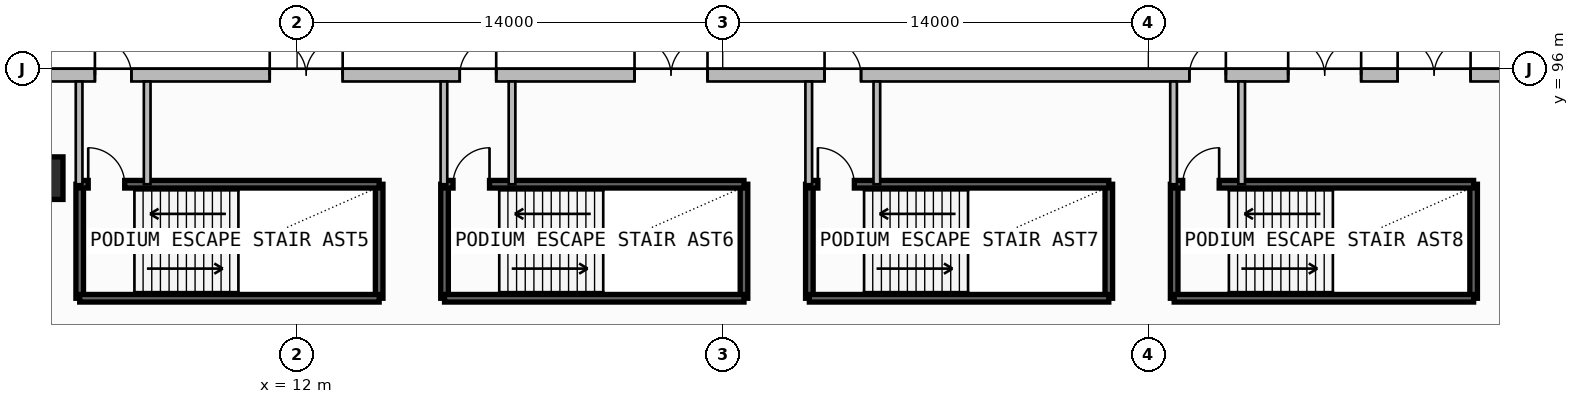
"""IFC4 building model, lengths in metres.
Left out: names, types, materials, properties, quantities, classifications, styles, units other than length and angle.
Written with IfcOpenShell. Run it as: python <this file> out.ifc"""

import sys

from ifc_helpers import new_model, si_unit, direction, frame, frame_2d, origin, origin_2d, place, context, subcontext, project, spatial, rectangle, extrude, element, fill, save


model = new_model("IFC4")
c1 = context("Model", 3, precision=1e-05, world=origin(), true_north=direction((0.0, 1.0)))
c2 = subcontext(c1, "Body", "Model", "MODEL_VIEW")
j1 = project(units=[si_unit("LENGTHUNIT", "METRE"), si_unit("PLANEANGLEUNIT", "RADIAN")], contexts=[c1])
p1 = place(None, origin())
s1 = spatial("IfcSite", under=j1, at=p1, CompositionType="ELEMENT")
p2 = place(p1, origin())
s2 = spatial("IfcBuilding", under=s1, at=p2, CompositionType="ELEMENT")
p3 = place(p2, origin())
s3 = spatial("IfcBuildingStorey", under=s2, at=p3, CompositionType="ELEMENT", Elevation=0.0)
p4 = place(p3, frame((3.6, 92.4, 0.0), z_axis=(0.0, 0.0, 1.0), x_axis=(1.0, 0.0, 0.0)))
e1 = element("IfcColumn", 1, at=p4, inside=s3, PredefinedType="COLUMN", context=c2, shape_type="SweptSolid", body=[
    extrude(rectangle(XDim=1.4, YDim=1.4, at=origin_2d()), origin(), (0.0, 0.0, 1.0), 4.5),
])
p5 = place(p3, frame((52.0, 95.79, 0.0), z_axis=(0.0, 0.0, 1.0), x_axis=(-1.0, 0.0, 0.0)))
e2 = element("IfcWall", 2, at=p5, inside=s3, PredefinedType="SOLIDWALL", context=c2, shape_type="SweptSolid", body=[
    extrude(rectangle(XDim=51.79, YDim=0.42, at=frame_2d((25.895, 0.0))), origin(), (0.0, 0.0, 1.0), 4.18),
])
p6 = place(p5, frame((1.4, 0.0, 0.0)))
e3 = element("IfcOpeningElement", 3, at=p6, cuts=e2, PredefinedType="OPENING", context=c2, shape_type="SweptSolid", body=[
    extrude(rectangle(XDim=2.4, YDim=2.4, at=frame_2d((1.2, 1.2))), frame((0.0, 0.22, 0.0), z_axis=(0.0, -1.0, 0.0), x_axis=(1.0, 0.0, 0.0)), (0.0, 0.0, 1.0), 0.44),
])
p7 = place(p5, frame((5.0, 0.0, 0.0)))
e4 = element("IfcOpeningElement", 4, at=p7, cuts=e2, PredefinedType="OPENING", context=c2, shape_type="SweptSolid", body=[
    extrude(rectangle(XDim=2.4, YDim=2.4, at=frame_2d((1.2, 1.2))), frame((0.0, 0.22, 0.0), z_axis=(0.0, -1.0, 0.0), x_axis=(1.0, 0.0, 0.0)), (0.0, 0.0, 1.0), 0.44),
])
p8 = place(p5, frame((26.5, 0.0, 0.0)))
e5 = element("IfcOpeningElement", 5, at=p8, cuts=e2, PredefinedType="OPENING", context=c2, shape_type="SweptSolid", body=[
    extrude(rectangle(XDim=2.4, YDim=2.4, at=frame_2d((1.2, 1.2))), frame((0.0, 0.22, 0.0), z_axis=(0.0, -1.0, 0.0), x_axis=(1.0, 0.0, 0.0)), (0.0, 0.0, 1.0), 0.44),
])
p9 = place(p5, frame((38.5, 0.0, 0.0)))
e6 = element("IfcOpeningElement", 6, at=p9, cuts=e2, PredefinedType="OPENING", context=c2, shape_type="SweptSolid", body=[
    extrude(rectangle(XDim=2.4, YDim=2.4, at=frame_2d((1.2, 1.2))), frame((0.0, 0.22, 0.0), z_axis=(0.0, -1.0, 0.0), x_axis=(1.0, 0.0, 0.0)), (0.0, 0.0, 1.0), 0.44),
])
p10 = place(p5, frame((45.45, 0.0, 0.0)))
e7 = element("IfcOpeningElement", 7, at=p10, cuts=e2, PredefinedType="OPENING", context=c2, shape_type="SweptSolid", body=[
    extrude(rectangle(XDim=1.2, YDim=2.2, at=frame_2d((0.6, 1.1))), frame((0.0, 0.22, 0.0), z_axis=(0.0, -1.0, 0.0), x_axis=(1.0, 0.0, 0.0)), (0.0, 0.0, 1.0), 0.44),
])
p11 = place(p5, frame((33.45, 0.0, 0.0)))
e8 = element("IfcOpeningElement", 8, at=p11, cuts=e2, PredefinedType="OPENING", context=c2, shape_type="SweptSolid", body=[
    extrude(rectangle(XDim=1.2, YDim=2.2, at=frame_2d((0.6, 1.1))), frame((0.0, 0.22, 0.0), z_axis=(0.0, -1.0, 0.0), x_axis=(1.0, 0.0, 0.0)), (0.0, 0.0, 1.0), 0.44),
])
p12 = place(p5, frame((21.45, 0.0, 0.0)))
e9 = element("IfcOpeningElement", 9, at=p12, cuts=e2, PredefinedType="OPENING", context=c2, shape_type="SweptSolid", body=[
    extrude(rectangle(XDim=1.2, YDim=2.2, at=frame_2d((0.6, 1.1))), frame((0.0, 0.22, 0.0), z_axis=(0.0, -1.0, 0.0), x_axis=(1.0, 0.0, 0.0)), (0.0, 0.0, 1.0), 0.44),
])
p13 = place(p5, frame((9.45, 0.0, 0.0)))
e10 = element("IfcOpeningElement", 10, at=p13, cuts=e2, PredefinedType="OPENING", context=c2, shape_type="SweptSolid", body=[
    extrude(rectangle(XDim=1.2, YDim=2.2, at=frame_2d((0.6, 1.1))), frame((0.0, 0.22, 0.0), z_axis=(0.0, -1.0, 0.0), x_axis=(1.0, 0.0, 0.0)), (0.0, 0.0, 1.0), 0.44),
])
for number, where, z_axis, x_axis in (
    (11, (4.85, 88.45, -0.4), (0.0, 0.0, 1.0), (0.0, 1.0, 0.0)),
    (12, (14.7, 88.45, -0.4), (0.0, 0.0, 1.0), (0.0, 1.0, 0.0)),
):
    element("IfcWall", number, at=place(p3, frame(where, z_axis=z_axis, x_axis=x_axis)), inside=s3, PredefinedType="SOLIDWALL", context=c2, shape_type="SweptSolid", body=[
        extrude(rectangle(XDim=3.75, YDim=0.25, at=frame_2d((1.875, 0.0))), origin(), (0.0, 0.0, 1.0), 4.58),
    ])
p14 = place(p3, frame((4.85, 92.2, -0.4), z_axis=(0.0, 0.0, 1.0), x_axis=(1.0, 0.0, 0.0)))
e13 = element("IfcWall", 13, at=p14, inside=s3, PredefinedType="SOLIDWALL", context=c2, shape_type="SweptSolid", body=[
    extrude(rectangle(XDim=9.85, YDim=0.25, at=frame_2d((4.925, 0.0))), origin(), (0.0, 0.0, 1.0), 4.58),
])
p15 = place(p14, frame((0.28, 0.0, 0.4)))
e14 = element("IfcOpeningElement", 14, at=p15, cuts=e13, PredefinedType="OPENING", context=c2, shape_type="SweptSolid", body=[
    extrude(rectangle(XDim=1.2, YDim=2.2, at=frame_2d((0.6, 1.1))), frame((0.0, 0.135, 0.0), z_axis=(0.0, -1.0, 0.0), x_axis=(1.0, 0.0, 0.0)), (0.0, 0.0, 1.0), 0.27),
])
p16 = place(p3, frame((4.85, 88.45, -0.4), z_axis=(0.0, 0.0, 1.0), x_axis=(1.0, 0.0, 0.0)))
e15 = element("IfcWall", 15, at=p16, inside=s3, PredefinedType="SOLIDWALL", context=c2, shape_type="SweptSolid", body=[
    extrude(rectangle(XDim=9.85, YDim=0.25, at=frame_2d((4.925, 0.0))), origin(), (0.0, 0.0, 1.0), 4.58),
])
for number, where, z_axis, x_axis in (
    (16, (4.83, 92.2, 0.0), (0.0, 0.0, 1.0), (0.0, 1.0, 0.0)),
    (17, (7.07, 92.2, 0.0), (0.0, 0.0, 1.0), (0.0, 1.0, 0.0)),
):
    element("IfcWall", number, at=place(p3, frame(where, z_axis=z_axis, x_axis=x_axis)), inside=s3, PredefinedType="SOLIDWALL", context=c2, shape_type="SweptSolid", body=[
        extrude(rectangle(XDim=3.38, YDim=0.22, at=frame_2d((1.69, 0.0))), origin(), (0.0, 0.0, 1.0), 4.18),
    ])
for number, where, z_axis, x_axis in (
    (18, (16.85, 88.45, -0.4), (0.0, 0.0, 1.0), (0.0, 1.0, 0.0)),
    (19, (26.7, 88.45, -0.4), (0.0, 0.0, 1.0), (0.0, 1.0, 0.0)),
):
    element("IfcWall", number, at=place(p3, frame(where, z_axis=z_axis, x_axis=x_axis)), inside=s3, PredefinedType="SOLIDWALL", context=c2, shape_type="SweptSolid", body=[
        extrude(rectangle(XDim=3.75, YDim=0.25, at=frame_2d((1.875, 0.0))), origin(), (0.0, 0.0, 1.0), 4.58),
    ])
p17 = place(p3, frame((16.85, 92.2, -0.4), z_axis=(0.0, 0.0, 1.0), x_axis=(1.0, 0.0, 0.0)))
e20 = element("IfcWall", 20, at=p17, inside=s3, PredefinedType="SOLIDWALL", context=c2, shape_type="SweptSolid", body=[
    extrude(rectangle(XDim=9.85, YDim=0.25, at=frame_2d((4.925, 0.0))), origin(), (0.0, 0.0, 1.0), 4.58),
])
p18 = place(p17, frame((0.28, 0.0, 0.4)))
e21 = element("IfcOpeningElement", 21, at=p18, cuts=e20, PredefinedType="OPENING", context=c2, shape_type="SweptSolid", body=[
    extrude(rectangle(XDim=1.2, YDim=2.2, at=frame_2d((0.6, 1.1))), frame((0.0, 0.135, 0.0), z_axis=(0.0, -1.0, 0.0), x_axis=(1.0, 0.0, 0.0)), (0.0, 0.0, 1.0), 0.27),
])
p19 = place(p3, frame((16.85, 88.45, -0.4), z_axis=(0.0, 0.0, 1.0), x_axis=(1.0, 0.0, 0.0)))
e22 = element("IfcWall", 22, at=p19, inside=s3, PredefinedType="SOLIDWALL", context=c2, shape_type="SweptSolid", body=[
    extrude(rectangle(XDim=9.85, YDim=0.25, at=frame_2d((4.925, 0.0))), origin(), (0.0, 0.0, 1.0), 4.58),
])
for number, where, z_axis, x_axis in (
    (23, (16.83, 92.2, 0.0), (0.0, 0.0, 1.0), (0.0, 1.0, 0.0)),
    (24, (19.07, 92.2, 0.0), (0.0, 0.0, 1.0), (0.0, 1.0, 0.0)),
):
    element("IfcWall", number, at=place(p3, frame(where, z_axis=z_axis, x_axis=x_axis)), inside=s3, PredefinedType="SOLIDWALL", context=c2, shape_type="SweptSolid", body=[
        extrude(rectangle(XDim=3.38, YDim=0.22, at=frame_2d((1.69, 0.0))), origin(), (0.0, 0.0, 1.0), 4.18),
    ])
for number, where, z_axis, x_axis in (
    (25, (28.85, 88.45, -0.4), (0.0, 0.0, 1.0), (0.0, 1.0, 0.0)),
    (26, (38.7, 88.45, -0.4), (0.0, 0.0, 1.0), (0.0, 1.0, 0.0)),
):
    element("IfcWall", number, at=place(p3, frame(where, z_axis=z_axis, x_axis=x_axis)), inside=s3, PredefinedType="SOLIDWALL", context=c2, shape_type="SweptSolid", body=[
        extrude(rectangle(XDim=3.75, YDim=0.25, at=frame_2d((1.875, 0.0))), origin(), (0.0, 0.0, 1.0), 4.58),
    ])
p20 = place(p3, frame((28.85, 92.2, -0.4), z_axis=(0.0, 0.0, 1.0), x_axis=(1.0, 0.0, 0.0)))
e27 = element("IfcWall", 27, at=p20, inside=s3, PredefinedType="SOLIDWALL", context=c2, shape_type="SweptSolid", body=[
    extrude(rectangle(XDim=9.85, YDim=0.25, at=frame_2d((4.925, 0.0))), origin(), (0.0, 0.0, 1.0), 4.58),
])
p21 = place(p20, frame((0.28, 0.0, 0.4)))
e28 = element("IfcOpeningElement", 28, at=p21, cuts=e27, PredefinedType="OPENING", context=c2, shape_type="SweptSolid", body=[
    extrude(rectangle(XDim=1.2, YDim=2.2, at=frame_2d((0.6, 1.1))), frame((0.0, 0.135, 0.0), z_axis=(0.0, -1.0, 0.0), x_axis=(1.0, 0.0, 0.0)), (0.0, 0.0, 1.0), 0.27),
])
p22 = place(p3, frame((28.85, 88.45, -0.4), z_axis=(0.0, 0.0, 1.0), x_axis=(1.0, 0.0, 0.0)))
e29 = element("IfcWall", 29, at=p22, inside=s3, PredefinedType="SOLIDWALL", context=c2, shape_type="SweptSolid", body=[
    extrude(rectangle(XDim=9.85, YDim=0.25, at=frame_2d((4.925, 0.0))), origin(), (0.0, 0.0, 1.0), 4.58),
])
for number, where, z_axis, x_axis in (
    (30, (28.83, 92.2, 0.0), (0.0, 0.0, 1.0), (0.0, 1.0, 0.0)),
    (31, (31.07, 92.2, 0.0), (0.0, 0.0, 1.0), (0.0, 1.0, 0.0)),
):
    element("IfcWall", number, at=place(p3, frame(where, z_axis=z_axis, x_axis=x_axis)), inside=s3, PredefinedType="SOLIDWALL", context=c2, shape_type="SweptSolid", body=[
        extrude(rectangle(XDim=3.38, YDim=0.22, at=frame_2d((1.69, 0.0))), origin(), (0.0, 0.0, 1.0), 4.18),
    ])
for number, where, z_axis, x_axis in (
    (32, (40.85, 88.45, -0.4), (0.0, 0.0, 1.0), (0.0, 1.0, 0.0)),
    (33, (50.7, 88.45, -0.4), (0.0, 0.0, 1.0), (0.0, 1.0, 0.0)),
):
    element("IfcWall", number, at=place(p3, frame(where, z_axis=z_axis, x_axis=x_axis)), inside=s3, PredefinedType="SOLIDWALL", context=c2, shape_type="SweptSolid", body=[
        extrude(rectangle(XDim=3.75, YDim=0.25, at=frame_2d((1.875, 0.0))), origin(), (0.0, 0.0, 1.0), 4.58),
    ])
p23 = place(p3, frame((40.85, 92.2, -0.4), z_axis=(0.0, 0.0, 1.0), x_axis=(1.0, 0.0, 0.0)))
e34 = element("IfcWall", 34, at=p23, inside=s3, PredefinedType="SOLIDWALL", context=c2, shape_type="SweptSolid", body=[
    extrude(rectangle(XDim=9.85, YDim=0.25, at=frame_2d((4.925, 0.0))), origin(), (0.0, 0.0, 1.0), 4.58),
])
p24 = place(p23, frame((0.28, 0.0, 0.4)))
e35 = element("IfcOpeningElement", 35, at=p24, cuts=e34, PredefinedType="OPENING", context=c2, shape_type="SweptSolid", body=[
    extrude(rectangle(XDim=1.2, YDim=2.2, at=frame_2d((0.6, 1.1))), frame((0.0, 0.135, 0.0), z_axis=(0.0, -1.0, 0.0), x_axis=(1.0, 0.0, 0.0)), (0.0, 0.0, 1.0), 0.27),
])
p25 = place(p3, frame((40.85, 88.45, -0.4), z_axis=(0.0, 0.0, 1.0), x_axis=(1.0, 0.0, 0.0)))
e36 = element("IfcWall", 36, at=p25, inside=s3, PredefinedType="SOLIDWALL", context=c2, shape_type="SweptSolid", body=[
    extrude(rectangle(XDim=9.85, YDim=0.25, at=frame_2d((4.925, 0.0))), origin(), (0.0, 0.0, 1.0), 4.58),
])
for number, where, z_axis, x_axis in (
    (37, (40.83, 92.2, 0.0), (0.0, 0.0, 1.0), (0.0, 1.0, 0.0)),
    (38, (43.07, 92.2, 0.0), (0.0, 0.0, 1.0), (0.0, 1.0, 0.0)),
):
    element("IfcWall", number, at=place(p3, frame(where, z_axis=z_axis, x_axis=x_axis)), inside=s3, PredefinedType="SOLIDWALL", context=c2, shape_type="SweptSolid", body=[
        extrude(rectangle(XDim=3.38, YDim=0.22, at=frame_2d((1.69, 0.0))), origin(), (0.0, 0.0, 1.0), 4.18),
    ])
p26 = place(p6, frame((2.4, 0.0, 0.0), z_axis=(0.0, 0.0, 1.0), x_axis=(-1.0, 0.0, 0.0)))
e39 = element("IfcDoor", 39, at=p26, inside=s3, OperationType="DOUBLE_DOOR_SINGLE_SWING", PredefinedType="USERDEFINED", context=c2, shape_type="SweptSolid", body=[
    extrude(rectangle(XDim=2.4, YDim=2.4, at=frame_2d((1.2, 1.2))), frame((0.0, 0.025, 0.0), z_axis=(0.0, -1.0, 0.0), x_axis=(1.0, 0.0, 0.0)), (0.0, 0.0, 1.0), 0.05),
])
fill(e3, e39)
p27 = place(p7, frame((2.4, 0.0, 0.0), z_axis=(0.0, 0.0, 1.0), x_axis=(-1.0, 0.0, 0.0)))
e40 = element("IfcDoor", 40, at=p27, inside=s3, OperationType="DOUBLE_DOOR_SINGLE_SWING", PredefinedType="USERDEFINED", context=c2, shape_type="SweptSolid", body=[
    extrude(rectangle(XDim=2.4, YDim=2.4, at=frame_2d((1.2, 1.2))), frame((0.0, 0.025, 0.0), z_axis=(0.0, -1.0, 0.0), x_axis=(1.0, 0.0, 0.0)), (0.0, 0.0, 1.0), 0.05),
])
fill(e4, e40)
p28 = place(p8, frame((2.4, 0.0, 0.0), z_axis=(0.0, 0.0, 1.0), x_axis=(-1.0, 0.0, 0.0)))
e41 = element("IfcDoor", 41, at=p28, inside=s3, OperationType="DOUBLE_DOOR_SINGLE_SWING", PredefinedType="USERDEFINED", context=c2, shape_type="SweptSolid", body=[
    extrude(rectangle(XDim=2.4, YDim=2.4, at=frame_2d((1.2, 1.2))), frame((0.0, 0.025, 0.0), z_axis=(0.0, -1.0, 0.0), x_axis=(1.0, 0.0, 0.0)), (0.0, 0.0, 1.0), 0.05),
])
fill(e5, e41)
p29 = place(p9, frame((2.4, 0.0, 0.0), z_axis=(0.0, 0.0, 1.0), x_axis=(-1.0, 0.0, 0.0)))
e42 = element("IfcDoor", 42, at=p29, inside=s3, OperationType="DOUBLE_DOOR_SINGLE_SWING", PredefinedType="USERDEFINED", context=c2, shape_type="SweptSolid", body=[
    extrude(rectangle(XDim=2.4, YDim=2.4, at=frame_2d((1.2, 1.2))), frame((0.0, 0.025, 0.0), z_axis=(0.0, -1.0, 0.0), x_axis=(1.0, 0.0, 0.0)), (0.0, 0.0, 1.0), 0.05),
])
fill(e6, e42)
p30 = place(p10, frame((1.2, 0.0, 0.0), z_axis=(0.0, 0.0, 1.0), x_axis=(-1.0, 0.0, 0.0)))
e43 = element("IfcDoor", 43, at=p30, inside=s3, OperationType="SINGLE_SWING_LEFT", PredefinedType="USERDEFINED", context=c2, shape_type="SweptSolid", body=[
    extrude(rectangle(XDim=1.2, YDim=2.2, at=frame_2d((0.6, 1.1))), frame((0.0, 0.025, 0.0), z_axis=(0.0, -1.0, 0.0), x_axis=(1.0, 0.0, 0.0)), (0.0, 0.0, 1.0), 0.05),
])
fill(e7, e43)
p31 = place(p11, frame((1.2, 0.0, 0.0), z_axis=(0.0, 0.0, 1.0), x_axis=(-1.0, 0.0, 0.0)))
e44 = element("IfcDoor", 44, at=p31, inside=s3, OperationType="SINGLE_SWING_RIGHT", PredefinedType="USERDEFINED", context=c2, shape_type="SweptSolid", body=[
    extrude(rectangle(XDim=1.2, YDim=2.2, at=frame_2d((0.6, 1.1))), frame((0.0, 0.025, 0.0), z_axis=(0.0, -1.0, 0.0), x_axis=(1.0, 0.0, 0.0)), (0.0, 0.0, 1.0), 0.05),
])
fill(e8, e44)
p32 = place(p12, frame((1.2, 0.0, 0.0), z_axis=(0.0, 0.0, 1.0), x_axis=(-1.0, 0.0, 0.0)))
e45 = element("IfcDoor", 45, at=p32, inside=s3, OperationType="SINGLE_SWING_LEFT", PredefinedType="USERDEFINED", context=c2, shape_type="SweptSolid", body=[
    extrude(rectangle(XDim=1.2, YDim=2.2, at=frame_2d((0.6, 1.1))), frame((0.0, 0.025, 0.0), z_axis=(0.0, -1.0, 0.0), x_axis=(1.0, 0.0, 0.0)), (0.0, 0.0, 1.0), 0.05),
])
fill(e9, e45)
p33 = place(p13, frame((1.2, 0.0, 0.0), z_axis=(0.0, 0.0, 1.0), x_axis=(-1.0, 0.0, 0.0)))
e46 = element("IfcDoor", 46, at=p33, inside=s3, OperationType="SINGLE_SWING_RIGHT", PredefinedType="USERDEFINED", context=c2, shape_type="SweptSolid", body=[
    extrude(rectangle(XDim=1.2, YDim=2.2, at=frame_2d((0.6, 1.1))), frame((0.0, 0.025, 0.0), z_axis=(0.0, -1.0, 0.0), x_axis=(1.0, 0.0, 0.0)), (0.0, 0.0, 1.0), 0.05),
])
fill(e10, e46)
p34 = place(p15, origin())
e47 = element("IfcDoor", 47, at=p34, inside=s3, OperationType="SINGLE_SWING_LEFT", PredefinedType="USERDEFINED", context=c2, shape_type="SweptSolid", body=[
    extrude(rectangle(XDim=1.2, YDim=2.2, at=frame_2d((0.6, 1.1))), frame((0.0, 0.025, 0.0), z_axis=(0.0, -1.0, 0.0), x_axis=(1.0, 0.0, 0.0)), (0.0, 0.0, 1.0), 0.05),
])
fill(e14, e47)
p35 = place(p18, origin())
e48 = element("IfcDoor", 48, at=p35, inside=s3, OperationType="SINGLE_SWING_RIGHT", PredefinedType="USERDEFINED", context=c2, shape_type="SweptSolid", body=[
    extrude(rectangle(XDim=1.2, YDim=2.2, at=frame_2d((0.6, 1.1))), frame((0.0, 0.025, 0.0), z_axis=(0.0, -1.0, 0.0), x_axis=(1.0, 0.0, 0.0)), (0.0, 0.0, 1.0), 0.05),
])
fill(e21, e48)
p36 = place(p21, origin())
e49 = element("IfcDoor", 49, at=p36, inside=s3, OperationType="SINGLE_SWING_LEFT", PredefinedType="USERDEFINED", context=c2, shape_type="SweptSolid", body=[
    extrude(rectangle(XDim=1.2, YDim=2.2, at=frame_2d((0.6, 1.1))), frame((0.0, 0.025, 0.0), z_axis=(0.0, -1.0, 0.0), x_axis=(1.0, 0.0, 0.0)), (0.0, 0.0, 1.0), 0.05),
])
fill(e28, e49)
p37 = place(p24, origin())
e50 = element("IfcDoor", 50, at=p37, inside=s3, OperationType="SINGLE_SWING_RIGHT", PredefinedType="USERDEFINED", context=c2, shape_type="SweptSolid", body=[
    extrude(rectangle(XDim=1.2, YDim=2.2, at=frame_2d((0.6, 1.1))), frame((0.0, 0.025, 0.0), z_axis=(0.0, -1.0, 0.0), x_axis=(1.0, 0.0, 0.0)), (0.0, 0.0, 1.0), 0.05),
])
fill(e35, e50)
save(model, sys.argv[1])
